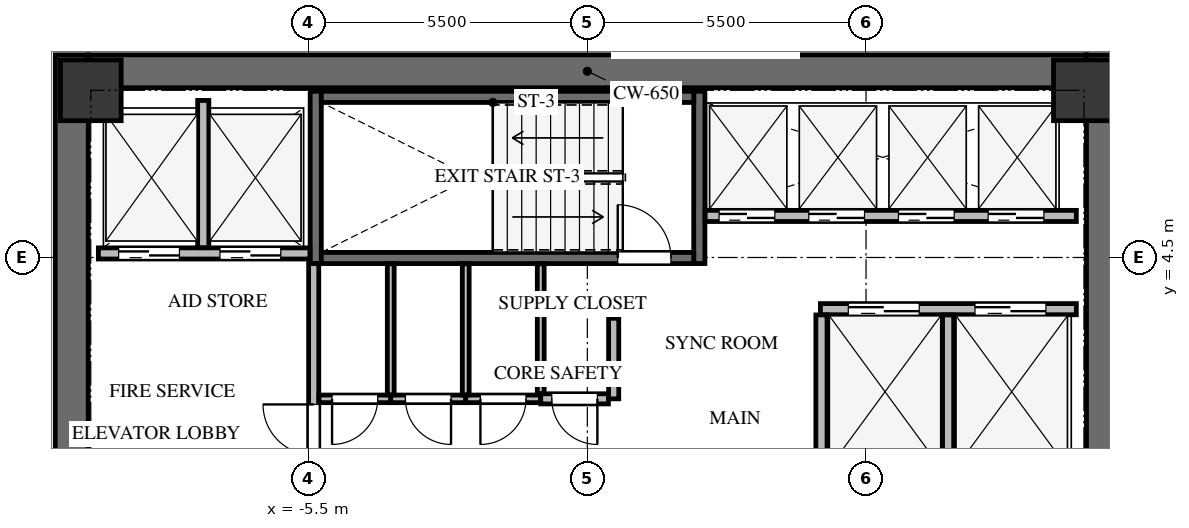
"""IFC4 building model, lengths in metres.
Left out: names, types, materials, properties, quantities, classifications, styles, units other than length and angle.
Written with IfcOpenShell. Run it as: python <this file> out.ifc"""

import sys

from ifc_helpers import new_model, si_unit, direction, frame, frame_2d, origin, origin_2d, place, context, subcontext, project, spatial, rectangle, extrude, source, transform, mapped, element, fill, save


model = new_model("IFC4")
c1 = context("Model", 3, precision=1e-05, world=origin(), true_north=direction((0.0, 1.0)))
c2 = subcontext(c1, "Body", "Model", "MODEL_VIEW")
j1 = project(units=[si_unit("LENGTHUNIT", "METRE"), si_unit("PLANEANGLEUNIT", "RADIAN")], contexts=[c1])
p1 = place(None, origin())
s1 = spatial("IfcSite", under=j1, at=p1, CompositionType="ELEMENT")
p2 = place(p1, origin())
s2 = spatial("IfcBuilding", under=s1, at=p2, CompositionType="ELEMENT")
p3 = place(p2, frame((0.0, 0.0, 180.4)))
s3 = spatial("IfcBuildingStorey", under=s2, at=p3, CompositionType="ELEMENT", Elevation=180.4)
for number, where, z_axis, x_axis in (
    (1, (-10.175, -8.5, 0.0), (0.0, 0.0, 1.0), (0.0, 1.0, 0.0)),
    (2, (10.175, -8.5, 0.0), (0.0, 0.0, 1.0), (0.0, 1.0, 0.0)),
):
    element("IfcWall", number, at=place(p3, frame(where, z_axis=z_axis, x_axis=x_axis)), inside=s3, PredefinedType="SHEAR", context=c2, shape_type="SweptSolid", body=[
        extrude(rectangle(XDim=17.0, YDim=0.65, at=frame_2d((8.5, 0.0))), origin(), (0.0, 0.0, 1.0), 3.3),
    ])
p4 = place(p3, frame((-9.85, 8.175, 0.0), z_axis=(0.0, 0.0, 1.0), x_axis=(1.0, 0.0, 0.0)))
e3 = element("IfcWall", 3, at=p4, inside=s3, PredefinedType="SHEAR", context=c2, shape_type="SweptSolid", body=[
    extrude(rectangle(XDim=19.7, YDim=0.65, at=frame_2d((9.85, 0.0))), origin(), (0.0, 0.0, 1.0), 3.3),
])
for number, where, z_axis, x_axis in (
    (4, (2.21, 4.38, -0.24), (0.0, 0.0, 1.0), (0.0, 1.0, 0.0)),
    (5, (-5.36, 7.78, -0.24), (0.0, 0.0, 1.0), (0.0, -1.0, 0.0)),
):
    element("IfcWall", number, at=place(p3, frame(where, z_axis=z_axis, x_axis=x_axis)), inside=s3, PredefinedType="SHEAR", context=c2, shape_type="SweptSolid", body=[
        extrude(rectangle(XDim=3.4, YDim=0.22, at=frame_2d((1.7, 0.0))), origin(), (0.0, 0.0, 1.0), 3.3),
    ])
p5 = place(p3, frame((-5.25, 4.49, -0.24), z_axis=(0.0, 0.0, 1.0), x_axis=(1.0, 0.0, 0.0)))
e6 = element("IfcWall", 6, at=p5, inside=s3, PredefinedType="SHEAR", context=c2, shape_type="SweptSolid", body=[
    extrude(rectangle(XDim=7.35, YDim=0.22, at=frame_2d((3.675, 0.0))), origin(), (0.0, 0.0, 1.0), 3.3),
])
p6 = place(p5, frame((5.85, 0.0, 0.0)))
e7 = element("IfcOpeningElement", 7, at=p6, cuts=e6, PredefinedType="OPENING", context=c2, shape_type="SweptSolid", body=[
    extrude(rectangle(XDim=1.05, YDim=2.15, at=frame_2d((0.525, 1.075))), frame((0.0, 0.12, 0.0), z_axis=(0.0, -1.0, 0.0), x_axis=(1.0, 0.0, 0.0)), (0.0, 0.0, 1.0), 0.24),
])
p7 = place(p3, frame((2.1, 7.67, -0.24), z_axis=(0.0, 0.0, 1.0), x_axis=(-1.0, 0.0, 0.0)))
e8 = element("IfcWall", 8, at=p7, inside=s3, PredefinedType="SHEAR", context=c2, shape_type="SweptSolid", body=[
    extrude(rectangle(XDim=7.35, YDim=0.22, at=frame_2d((3.675, 0.0))), origin(), (0.0, 0.0, 1.0), 3.3),
])
m1 = source(origin(), c2, "Body", "SweptSolid", [
    extrude(rectangle(XDim=1.2, YDim=1.2, at=origin_2d()), origin(), (0.0, 0.0, 1.0), 3.3),
])
for number, where, z_axis, x_axis in (
    (9, (9.8, 7.8, -0.24), (0.0, 0.0, 1.0), (1.0, 0.0, 0.0)),
    (10, (-9.8, 7.8, -0.24), (0.0, 0.0, 1.0), (1.0, 0.0, 0.0)),
):
    element("IfcColumn", number, at=place(p3, frame(where, z_axis=z_axis, x_axis=x_axis)), inside=s3, PredefinedType="COLUMN", context=c2, shape_type="MappedRepresentation", body=[
        mapped(m1, transform((0.0, 0.0, 0.0), x_axis=(1.0, 0.0, 0.0), y_axis=(0.0, 1.0, 0.0), z_axis=(0.0, 0.0, 1.0), scale=1.0)),
    ])
p8 = place(p3, frame((-9.65, 4.58, 0.0), z_axis=(0.0, 0.0, 1.0), x_axis=(1.0, 0.0, 0.0)))
e11 = element("IfcWall", 11, at=p8, inside=s3, PredefinedType="SOLIDWALL", context=c2, shape_type="SweptSolid", body=[
    extrude(rectangle(XDim=4.175, YDim=0.22, at=frame_2d((2.087, 0.0))), origin(), (0.0, 0.0, 1.0), 3.045),
])
p9 = place(p8, frame((0.4, 0.0, 0.0)))
e12 = element("IfcOpeningElement", 12, at=p9, cuts=e11, PredefinedType="OPENING", context=c2, shape_type="SweptSolid", body=[
    extrude(rectangle(XDim=1.2, YDim=2.15, at=frame_2d((0.6, 1.075))), frame((0.0, 0.12, 0.0), z_axis=(0.0, -1.0, 0.0), x_axis=(1.0, 0.0, 0.0)), (0.0, 0.0, 1.0), 0.24),
])
p10 = place(p8, frame((2.4, 0.0, 0.0)))
e13 = element("IfcOpeningElement", 13, at=p10, cuts=e11, PredefinedType="OPENING", context=c2, shape_type="SweptSolid", body=[
    extrude(rectangle(XDim=1.2, YDim=2.15, at=frame_2d((0.6, 1.075))), frame((0.0, 0.12, 0.0), z_axis=(0.0, -1.0, 0.0), x_axis=(1.0, 0.0, 0.0)), (0.0, 0.0, 1.0), 0.24),
])
p11 = place(p3, frame((-7.58, 4.694, 0.0), z_axis=(0.0, 0.0, 1.0), x_axis=(0.0, 1.0, 0.0)))
e14 = element("IfcWall", 14, at=p11, inside=s3, PredefinedType="SOLIDWALL", context=c2, shape_type="SweptSolid", body=[
    extrude(rectangle(XDim=2.906, YDim=0.22, at=frame_2d((1.453, 0.0))), origin(), (0.0, 0.0, 1.0), 3.045),
])
p12 = place(p3, frame((-5.4, 0.354, 0.0), z_axis=(0.0, 0.0, 1.0), x_axis=(0.0, 1.0, 0.0)))
e15 = element("IfcWall", 15, at=p12, inside=s3, PredefinedType="SOLIDWALL", context=c2, shape_type="SweptSolid", body=[
    extrude(rectangle(XDim=4.026, YDim=0.2, at=frame_2d((2.013, 0.0))), origin(), (0.0, 0.0, 1.0), 3.045),
])
p13 = place(p12, frame((0.246, 0.0, 0.0)))
e16 = element("IfcOpeningElement", 16, at=p13, cuts=e15, PredefinedType="OPENING", context=c2, shape_type="SweptSolid", body=[
    extrude(rectangle(XDim=1.0, YDim=2.15, at=frame_2d((0.5, 1.075))), frame((0.0, 0.11, 0.0), z_axis=(0.0, -1.0, 0.0), x_axis=(1.0, 0.0, 0.0)), (0.0, 0.0, 1.0), 0.22),
])
p14 = place(p3, frame((4.6, 3.48, 0.0), z_axis=(0.0, 0.0, 1.0), x_axis=(1.0, 0.0, 0.0)))
e17 = element("IfcWall", 17, at=p14, inside=s3, PredefinedType="SOLIDWALL", context=c2, shape_type="SweptSolid", body=[
    extrude(rectangle(XDim=5.05, YDim=0.22, at=frame_2d((2.525, 0.0))), origin(), (0.0, 0.0, 1.0), 3.045),
])
p15 = place(p14, frame((0.55, 0.0, 0.0)))
e18 = element("IfcOpeningElement", 18, at=p15, cuts=e17, PredefinedType="OPENING", context=c2, shape_type="SweptSolid", body=[
    extrude(rectangle(XDim=1.4, YDim=2.15, at=frame_2d((0.7, 1.075))), frame((0.0, 0.12, 0.0), z_axis=(0.0, -1.0, 0.0), x_axis=(1.0, 0.0, 0.0)), (0.0, 0.0, 1.0), 0.24),
])
p16 = place(p14, frame((3.05, 0.0, 0.0)))
e19 = element("IfcOpeningElement", 19, at=p16, cuts=e17, PredefinedType="OPENING", context=c2, shape_type="SweptSolid", body=[
    extrude(rectangle(XDim=1.4, YDim=2.15, at=frame_2d((0.7, 1.075))), frame((0.0, 0.12, 0.0), z_axis=(0.0, -1.0, 0.0), x_axis=(1.0, 0.0, 0.0)), (0.0, 0.0, 1.0), 0.24),
])
for number, where, z_axis, x_axis in (
    (20, (4.62, 0.18, 0.0), (0.0, 0.0, 1.0), (0.0, 1.0, 0.0)),
    (21, (7.12, 0.18, 0.0), (0.0, 0.0, 1.0), (0.0, 1.0, 0.0)),
):
    element("IfcWall", number, at=place(p3, frame(where, z_axis=z_axis, x_axis=x_axis)), inside=s3, PredefinedType="SOLIDWALL", context=c2, shape_type="SweptSolid", body=[
        extrude(rectangle(XDim=3.186, YDim=0.22, at=frame_2d((1.593, 0.0))), origin(), (0.0, 0.0, 1.0), 3.045),
    ])
p17 = place(p3, frame((2.325, 5.32, 0.0), z_axis=(0.0, 0.0, 1.0), x_axis=(1.0, 0.0, 0.0)))
e22 = element("IfcWall", 22, at=p17, inside=s3, PredefinedType="SOLIDWALL", context=c2, shape_type="SweptSolid", body=[
    extrude(rectangle(XDim=7.325, YDim=0.22, at=frame_2d((3.663, 0.0))), origin(), (0.0, 0.0, 1.0), 3.045),
])
p18 = place(p17, frame((0.275, 0.0, 0.0)))
e23 = element("IfcOpeningElement", 23, at=p18, cuts=e22, PredefinedType="OPENING", context=c2, shape_type="SweptSolid", body=[
    extrude(rectangle(XDim=1.1, YDim=2.15, at=frame_2d((0.55, 1.075))), frame((0.0, 0.12, 0.0), z_axis=(0.0, -1.0, 0.0), x_axis=(1.0, 0.0, 0.0)), (0.0, 0.0, 1.0), 0.24),
])
p19 = place(p17, frame((2.045, 0.0, 0.0)))
e24 = element("IfcOpeningElement", 24, at=p19, cuts=e22, PredefinedType="OPENING", context=c2, shape_type="SweptSolid", body=[
    extrude(rectangle(XDim=1.1, YDim=2.15, at=frame_2d((0.55, 1.075))), frame((0.0, 0.12, 0.0), z_axis=(0.0, -1.0, 0.0), x_axis=(1.0, 0.0, 0.0)), (0.0, 0.0, 1.0), 0.24),
])
p20 = place(p17, frame((3.815, 0.0, 0.0)))
e25 = element("IfcOpeningElement", 25, at=p20, cuts=e22, PredefinedType="OPENING", context=c2, shape_type="SweptSolid", body=[
    extrude(rectangle(XDim=1.1, YDim=2.15, at=frame_2d((0.55, 1.075))), frame((0.0, 0.12, 0.0), z_axis=(0.0, -1.0, 0.0), x_axis=(1.0, 0.0, 0.0)), (0.0, 0.0, 1.0), 0.24),
])
p21 = place(p17, frame((5.585, 0.0, 0.0)))
e26 = element("IfcOpeningElement", 26, at=p21, cuts=e22, PredefinedType="OPENING", context=c2, shape_type="SweptSolid", body=[
    extrude(rectangle(XDim=1.1, YDim=2.15, at=frame_2d((0.55, 1.075))), frame((0.0, 0.12, 0.0), z_axis=(0.0, -1.0, 0.0), x_axis=(1.0, 0.0, 0.0)), (0.0, 0.0, 1.0), 0.24),
])
p22 = place(p3, frame((-3.88, 1.71, 0.0), z_axis=(0.0, 0.0, 1.0), x_axis=(-1.0, 0.0, 0.0)))
e27 = element("IfcWall", 27, at=p22, inside=s3, PredefinedType="PARTITIONING", context=c2, shape_type="SweptSolid", body=[
    extrude(rectangle(XDim=1.416, YDim=0.15, at=frame_2d((0.708, 0.0))), origin(), (0.0, 0.0, 1.0), 3.045),
])
p23 = place(p22, frame((0.258, 0.0, 0.0)))
e28 = element("IfcOpeningElement", 28, at=p23, cuts=e27, PredefinedType="OPENING", context=c2, shape_type="SweptSolid", body=[
    extrude(rectangle(XDim=0.9, YDim=2.05, at=frame_2d((0.45, 1.025))), frame((0.0, 0.085, 0.0), z_axis=(0.0, -1.0, 0.0), x_axis=(1.0, 0.0, 0.0)), (0.0, 0.0, 1.0), 0.17),
])
p24 = place(p3, frame((-2.4, 1.71, 0.0), z_axis=(0.0, 0.0, 1.0), x_axis=(-1.0, 0.0, 0.0)))
e29 = element("IfcWall", 29, at=p24, inside=s3, PredefinedType="PARTITIONING", context=c2, shape_type="SweptSolid", body=[
    extrude(rectangle(XDim=1.48, YDim=0.15, at=frame_2d((0.74, 0.0))), origin(), (0.0, 0.0, 1.0), 3.045),
])
p25 = place(p24, frame((0.29, 0.0, 0.0)))
e30 = element("IfcOpeningElement", 30, at=p25, cuts=e29, PredefinedType="OPENING", context=c2, shape_type="SweptSolid", body=[
    extrude(rectangle(XDim=0.9, YDim=2.05, at=frame_2d((0.45, 1.025))), frame((0.0, 0.085, 0.0), z_axis=(0.0, -1.0, 0.0), x_axis=(1.0, 0.0, 0.0)), (0.0, 0.0, 1.0), 0.17),
])
p26 = place(p3, frame((-0.92, 1.71, 0.0), z_axis=(0.0, 0.0, 1.0), x_axis=(-1.0, 0.0, 0.0)))
e31 = element("IfcWall", 31, at=p26, inside=s3, PredefinedType="PARTITIONING", context=c2, shape_type="SweptSolid", body=[
    extrude(rectangle(XDim=1.48, YDim=0.15, at=frame_2d((0.74, 0.0))), origin(), (0.0, 0.0, 1.0), 3.045),
])
p27 = place(p26, frame((0.29, 0.0, 0.0)))
e32 = element("IfcOpeningElement", 32, at=p27, cuts=e31, PredefinedType="OPENING", context=c2, shape_type="SweptSolid", body=[
    extrude(rectangle(XDim=0.9, YDim=2.05, at=frame_2d((0.45, 1.025))), frame((0.0, 0.085, 0.0), z_axis=(0.0, -1.0, 0.0), x_axis=(1.0, 0.0, 0.0)), (0.0, 0.0, 1.0), 0.17),
])
p28 = place(p3, frame((0.52, 3.3, 0.0), z_axis=(0.0, 0.0, 1.0), x_axis=(0.0, -1.0, 0.0)))
e33 = element("IfcWall", 33, at=p28, inside=s3, PredefinedType="SOLIDWALL", context=c2, shape_type="SweptSolid", body=[
    extrude(rectangle(XDim=1.59, YDim=0.2, at=frame_2d((0.795, 0.0))), origin(), (0.0, 0.0, 1.0), 3.045),
])
p29 = place(p3, frame((0.416, 1.71, 0.0), z_axis=(0.0, 0.0, 1.0), x_axis=(-1.0, 0.0, 0.0)))
e34 = element("IfcWall", 34, at=p29, inside=s3, PredefinedType="SOLIDWALL", context=c2, shape_type="SweptSolid", body=[
    extrude(rectangle(XDim=1.336, YDim=0.2, at=frame_2d((0.668, 0.0))), origin(), (0.0, 0.0, 1.0), 3.045),
])
p30 = place(p29, frame((0.218, 0.0, 0.0)))
e35 = element("IfcOpeningElement", 35, at=p30, cuts=e34, PredefinedType="OPENING", context=c2, shape_type="SweptSolid", body=[
    extrude(rectangle(XDim=0.9, YDim=2.05, at=frame_2d((0.45, 1.025))), frame((0.0, 0.11, 0.0), z_axis=(0.0, -1.0, 0.0), x_axis=(1.0, 0.0, 0.0)), (0.0, 0.0, 1.0), 0.22),
])
for number, where, z_axis, x_axis in (
    (36, (-3.88, 4.375, 0.0), (0.0, 0.0, 1.0), (0.0, -1.0, 0.0)),
    (37, (-2.4, 4.375, 0.0), (0.0, 0.0, 1.0), (0.0, -1.0, 0.0)),
):
    element("IfcWall", number, at=place(p3, frame(where, z_axis=z_axis, x_axis=x_axis)), inside=s3, PredefinedType="PARTITIONING", context=c2, shape_type="SweptSolid", body=[
        extrude(rectangle(XDim=2.586, YDim=0.135, at=frame_2d((1.293, 0.0))), origin(), (0.0, 0.0, 1.0), 3.045),
    ])
p31 = place(p3, frame((-0.92, 4.375, 0.0), z_axis=(0.0, 0.0, 1.0), x_axis=(0.0, -1.0, 0.0)))
e38 = element("IfcWall", 38, at=p31, inside=s3, PredefinedType="PARTITIONING", context=c2, shape_type="SweptSolid", body=[
    extrude(rectangle(XDim=2.561, YDim=0.135, at=frame_2d((1.281, 0.0))), origin(), (0.0, 0.0, 1.0), 3.045),
])
m2 = source(origin(), c2, "Body", "SweptSolid", [
    extrude(rectangle(XDim=1.05, YDim=2.15, at=frame_2d((0.525, 1.075))), frame((0.0, 0.025, 0.0), z_axis=(0.0, -1.0, 0.0), x_axis=(1.0, 0.0, 0.0)), (0.0, 0.0, 1.0), 0.05),
])
p32 = place(p6, origin())
e39 = element("IfcDoor", 39, at=p32, inside=s3, OperationType="SINGLE_SWING_LEFT", PredefinedType="DOOR", context=c2, shape_type="MappedRepresentation", body=[
    mapped(m2, transform((0.0, 0.0, 0.0), x_axis=(1.0, 0.0, 0.0), y_axis=(0.0, 1.0, 0.0), z_axis=(0.0, 0.0, 1.0), scale=1.0)),
])
fill(e7, e39)
m3 = source(origin(), c2, "Body", "SweptSolid", [
    extrude(rectangle(XDim=1.2, YDim=2.15, at=frame_2d((0.6, 1.075))), frame((0.0, 0.025, 0.0), z_axis=(0.0, -1.0, 0.0), x_axis=(1.0, 0.0, 0.0)), (0.0, 0.0, 1.0), 0.05),
])
p33 = place(p9, origin())
e40 = element("IfcDoor", 40, at=p33, inside=s3, OperationType="DOUBLE_DOOR_SLIDING", PredefinedType="DOOR", context=c2, shape_type="MappedRepresentation", body=[
    mapped(m3, transform((0.0, 0.0, 0.0), x_axis=(1.0, 0.0, 0.0), y_axis=(0.0, 1.0, 0.0), z_axis=(0.0, 0.0, 1.0), scale=1.0)),
])
fill(e12, e40)
p34 = place(p10, origin())
e41 = element("IfcDoor", 41, at=p34, inside=s3, OperationType="DOUBLE_DOOR_SLIDING", PredefinedType="DOOR", context=c2, shape_type="MappedRepresentation", body=[
    mapped(m3, transform((0.0, 0.0, 0.0), x_axis=(1.0, 0.0, 0.0), y_axis=(0.0, 1.0, 0.0), z_axis=(0.0, 0.0, 1.0), scale=1.0)),
])
fill(e13, e41)
m4 = source(origin(), c2, "Body", "SweptSolid", [
    extrude(rectangle(XDim=1.0, YDim=2.15, at=frame_2d((0.5, 1.075))), frame((0.0, 0.025, 0.0), z_axis=(0.0, -1.0, 0.0), x_axis=(1.0, 0.0, 0.0)), (0.0, 0.0, 1.0), 0.05),
])
p35 = place(p13, origin())
e42 = element("IfcDoor", 42, at=p35, inside=s3, OperationType="SINGLE_SWING_RIGHT", PredefinedType="DOOR", context=c2, shape_type="MappedRepresentation", body=[
    mapped(m4, transform((0.0, 0.0, 0.0), x_axis=(1.0, 0.0, 0.0), y_axis=(0.0, 1.0, 0.0), z_axis=(0.0, 0.0, 1.0), scale=1.0)),
])
fill(e16, e42)
m5 = source(origin(), c2, "Body", "SweptSolid", [
    extrude(rectangle(XDim=1.4, YDim=2.15, at=frame_2d((0.7, 1.075))), frame((0.0, 0.025, 0.0), z_axis=(0.0, -1.0, 0.0), x_axis=(1.0, 0.0, 0.0)), (0.0, 0.0, 1.0), 0.05),
])
p36 = place(p15, origin())
e43 = element("IfcDoor", 43, at=p36, inside=s3, OperationType="DOUBLE_DOOR_SLIDING", PredefinedType="DOOR", context=c2, shape_type="MappedRepresentation", body=[
    mapped(m5, transform((0.0, 0.0, 0.0), x_axis=(1.0, 0.0, 0.0), y_axis=(0.0, 1.0, 0.0), z_axis=(0.0, 0.0, 1.0), scale=1.0)),
])
fill(e18, e43)
p37 = place(p16, origin())
e44 = element("IfcDoor", 44, at=p37, inside=s3, OperationType="DOUBLE_DOOR_SLIDING", PredefinedType="DOOR", context=c2, shape_type="MappedRepresentation", body=[
    mapped(m5, transform((0.0, 0.0, 0.0), x_axis=(1.0, 0.0, 0.0), y_axis=(0.0, 1.0, 0.0), z_axis=(0.0, 0.0, 1.0), scale=1.0)),
])
fill(e19, e44)
m6 = source(origin(), c2, "Body", "SweptSolid", [
    extrude(rectangle(XDim=1.1, YDim=2.15, at=frame_2d((0.55, 1.075))), frame((0.0, 0.025, 0.0), z_axis=(0.0, -1.0, 0.0), x_axis=(1.0, 0.0, 0.0)), (0.0, 0.0, 1.0), 0.05),
])
p38 = place(p18, origin())
e45 = element("IfcDoor", 45, at=p38, inside=s3, OperationType="DOUBLE_DOOR_SLIDING", PredefinedType="DOOR", context=c2, shape_type="MappedRepresentation", body=[
    mapped(m6, transform((0.0, 0.0, 0.0), x_axis=(1.0, 0.0, 0.0), y_axis=(0.0, 1.0, 0.0), z_axis=(0.0, 0.0, 1.0), scale=1.0)),
])
fill(e23, e45)
p39 = place(p19, origin())
e46 = element("IfcDoor", 46, at=p39, inside=s3, OperationType="DOUBLE_DOOR_SLIDING", PredefinedType="DOOR", context=c2, shape_type="MappedRepresentation", body=[
    mapped(m6, transform((0.0, 0.0, 0.0), x_axis=(1.0, 0.0, 0.0), y_axis=(0.0, 1.0, 0.0), z_axis=(0.0, 0.0, 1.0), scale=1.0)),
])
fill(e24, e46)
p40 = place(p20, origin())
e47 = element("IfcDoor", 47, at=p40, inside=s3, OperationType="DOUBLE_DOOR_SLIDING", PredefinedType="DOOR", context=c2, shape_type="MappedRepresentation", body=[
    mapped(m6, transform((0.0, 0.0, 0.0), x_axis=(1.0, 0.0, 0.0), y_axis=(0.0, 1.0, 0.0), z_axis=(0.0, 0.0, 1.0), scale=1.0)),
])
fill(e25, e47)
p41 = place(p21, origin())
e48 = element("IfcDoor", 48, at=p41, inside=s3, OperationType="DOUBLE_DOOR_SLIDING", PredefinedType="DOOR", context=c2, shape_type="MappedRepresentation", body=[
    mapped(m6, transform((0.0, 0.0, 0.0), x_axis=(1.0, 0.0, 0.0), y_axis=(0.0, 1.0, 0.0), z_axis=(0.0, 0.0, 1.0), scale=1.0)),
])
fill(e26, e48)
m7 = source(origin(), c2, "Body", "SweptSolid", [
    extrude(rectangle(XDim=0.9, YDim=2.05, at=frame_2d((0.45, 1.025))), frame((0.0, 0.025, 0.0), z_axis=(0.0, -1.0, 0.0), x_axis=(1.0, 0.0, 0.0)), (0.0, 0.0, 1.0), 0.05),
])
p42 = place(p23, origin())
e49 = element("IfcDoor", 49, at=p42, inside=s3, OperationType="SINGLE_SWING_RIGHT", PredefinedType="DOOR", context=c2, shape_type="MappedRepresentation", body=[
    mapped(m7, transform((0.0, 0.0, 0.0), x_axis=(1.0, 0.0, 0.0), y_axis=(0.0, 1.0, 0.0), z_axis=(0.0, 0.0, 1.0), scale=1.0)),
])
fill(e28, e49)
m8 = source(origin(), c2, "Body", "SweptSolid", [
    extrude(rectangle(XDim=0.9, YDim=2.05, at=frame_2d((0.45, 1.025))), frame((0.0, 0.025, 0.0), z_axis=(0.0, -1.0, 0.0), x_axis=(1.0, 0.0, 0.0)), (0.0, 0.0, 1.0), 0.05),
])
p43 = place(p25, origin())
e50 = element("IfcDoor", 50, at=p43, inside=s3, OperationType="SINGLE_SWING_LEFT", PredefinedType="DOOR", context=c2, shape_type="MappedRepresentation", body=[
    mapped(m8, transform((0.0, 0.0, 0.0), x_axis=(1.0, 0.0, 0.0), y_axis=(0.0, 1.0, 0.0), z_axis=(0.0, 0.0, 1.0), scale=1.0)),
])
fill(e30, e50)
p44 = place(p27, origin())
e51 = element("IfcDoor", 51, at=p44, inside=s3, OperationType="SINGLE_SWING_RIGHT", PredefinedType="DOOR", context=c2, shape_type="MappedRepresentation", body=[
    mapped(m7, transform((0.0, 0.0, 0.0), x_axis=(1.0, 0.0, 0.0), y_axis=(0.0, 1.0, 0.0), z_axis=(0.0, 0.0, 1.0), scale=1.0)),
])
fill(e32, e51)
p45 = place(p30, origin())
e52 = element("IfcDoor", 52, at=p45, inside=s3, OperationType="SINGLE_SWING_LEFT", PredefinedType="DOOR", context=c2, shape_type="MappedRepresentation", body=[
    mapped(m8, transform((0.0, 0.0, 0.0), x_axis=(1.0, 0.0, 0.0), y_axis=(0.0, 1.0, 0.0), z_axis=(0.0, 0.0, 1.0), scale=1.0)),
])
fill(e35, e52)
save(model, sys.argv[1])
